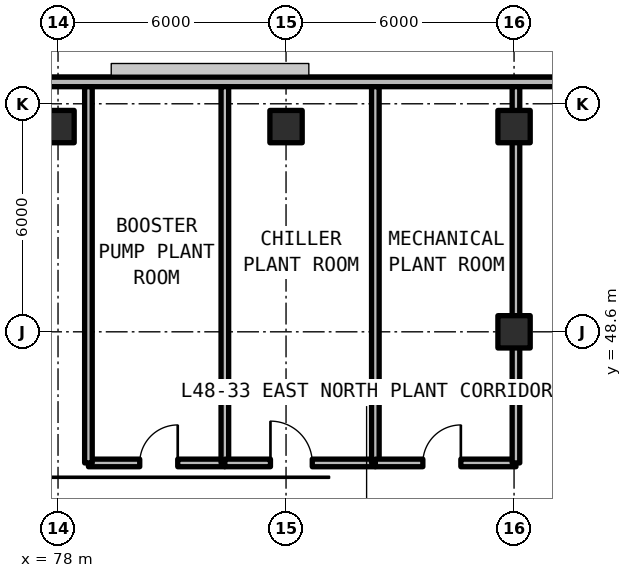
"""IFC4 building model, lengths in metres.
Left out: names, types, materials, properties, quantities, classifications, styles, units other than length and angle.
Written with IfcOpenShell. Run it as: python <this file> out.ifc"""

import sys

from ifc_helpers import new_model, si_unit, direction, frame, frame_2d, origin, origin_2d, place, context, subcontext, project, spatial, rectangle, extrude, element, fill, save


model = new_model("IFC4")
c1 = context("Model", 3, precision=1e-05, world=origin(), true_north=direction((0.0, 1.0)))
c2 = subcontext(c1, "Body", "Model", "MODEL_VIEW")
j1 = project(units=[si_unit("LENGTHUNIT", "METRE"), si_unit("PLANEANGLEUNIT", "RADIAN")], contexts=[c1])
p1 = place(None, origin())
s1 = spatial("IfcSite", under=j1, at=p1, CompositionType="ELEMENT")
p2 = place(p1, origin())
s2 = spatial("IfcBuilding", under=s1, at=p2, CompositionType="ELEMENT")
p3 = place(p2, frame((0.0, 0.0, 172.92)))
s3 = spatial("IfcBuildingStorey", under=s2, at=p3, CompositionType="ELEMENT", Elevation=172.92)
p4 = place(p3, frame((90.0, 48.6, 0.0), z_axis=(0.0, 0.0, 1.0), x_axis=(1.0, 0.0, 0.0)))
e1 = element("IfcColumn", 1, at=p4, inside=s3, PredefinedType="COLUMN", context=c2, shape_type="SweptSolid", body=[
    extrude(rectangle(XDim=0.85, YDim=0.85, at=origin_2d()), origin(), (0.0, 0.0, 1.0), 4.95),
])
for number, where, z_axis, x_axis in (
    (2, (78.0, 54.0, 0.0), (0.0, 0.0, 1.0), (1.0, 0.0, 0.0)),
    (3, (84.0, 54.0, 0.0), (0.0, 0.0, 1.0), (1.0, 0.0, 0.0)),
    (4, (90.0, 54.0, 0.0), (0.0, 0.0, 1.0), (1.0, 0.0, 0.0)),
):
    element("IfcColumn", number, at=place(p3, frame(where, z_axis=z_axis, x_axis=x_axis)), inside=s3, PredefinedType="COLUMN", context=c2, shape_type="SweptSolid", body=[
        extrude(rectangle(XDim=0.85, YDim=0.85, at=origin_2d()), origin(), (0.0, 0.0, 1.0), 4.67),
    ])
p5 = place(p3, frame((95.748, 55.175, 0.0), z_axis=(0.0, 0.0, 1.0), x_axis=(-1.0, 0.0, 0.0)))
e5 = element("IfcWall", 5, at=p5, inside=s3, PredefinedType="SOLIDWALL", context=c2, shape_type="SweptSolid", body=[
    extrude(rectangle(XDim=20.823, YDim=0.25, at=frame_2d((10.412, 0.0))), origin(), (0.0, 0.0, 1.0), 4.67),
])
p6 = place(p3, frame((78.8, 45.15, 0.0), z_axis=(0.0, 0.0, 1.0), x_axis=(1.0, 0.0, 0.0)))
e6 = element("IfcWall", 6, at=p6, inside=s3, PredefinedType="SOLIDWALL", context=c2, shape_type="SweptSolid", body=[
    extrude(rectangle(XDim=3.59, YDim=0.2, at=frame_2d((1.795, 0.0))), origin(), (0.0, 0.0, 1.0), 3.89),
])
p7 = place(p6, frame((1.35, 0.0, 0.0)))
e7 = element("IfcOpeningElement", 7, at=p7, cuts=e6, PredefinedType="OPENING", context=c2, shape_type="SweptSolid", body=[
    extrude(rectangle(XDim=1.0, YDim=2.15, at=frame_2d((0.5, 1.075))), frame((0.0, 0.11, 0.0), z_axis=(0.0, -1.0, 0.0), x_axis=(1.0, 0.0, 0.0)), (0.0, 0.0, 1.0), 0.22),
])
for number, where, z_axis, x_axis in (
    (8, (78.8, 45.15, 0.0), (0.0, 0.0, 1.0), (0.0, 1.0, 0.0)),
    (9, (82.39, 45.15, 0.0), (0.0, 0.0, 1.0), (0.0, 1.0, 0.0)),
):
    element("IfcWall", number, at=place(p3, frame(where, z_axis=z_axis, x_axis=x_axis)), inside=s3, PredefinedType="SOLIDWALL", context=c2, shape_type="SweptSolid", body=[
        extrude(rectangle(XDim=9.9, YDim=0.2, at=frame_2d((4.95, 0.0))), origin(), (0.0, 0.0, 1.0), 3.89),
    ])
p8 = place(p3, frame((82.39, 45.15, 0.0), z_axis=(0.0, 0.0, 1.0), x_axis=(1.0, 0.0, 0.0)))
e10 = element("IfcWall", 10, at=p8, inside=s3, PredefinedType="SOLIDWALL", context=c2, shape_type="SweptSolid", body=[
    extrude(rectangle(XDim=3.96, YDim=0.2, at=frame_2d((1.98, 0.0))), origin(), (0.0, 0.0, 1.0), 3.89),
])
p9 = place(p8, frame((1.2, 0.0, 0.0)))
e11 = element("IfcOpeningElement", 11, at=p9, cuts=e10, PredefinedType="OPENING", context=c2, shape_type="SweptSolid", body=[
    extrude(rectangle(XDim=1.1, YDim=2.15, at=frame_2d((0.55, 1.075))), frame((0.0, 0.11, 0.0), z_axis=(0.0, -1.0, 0.0), x_axis=(1.0, 0.0, 0.0)), (0.0, 0.0, 1.0), 0.22),
])
p10 = place(p3, frame((86.35, 45.15, 0.0), z_axis=(0.0, 0.0, 1.0), x_axis=(0.0, 1.0, 0.0)))
e12 = element("IfcWall", 12, at=p10, inside=s3, PredefinedType="SOLIDWALL", context=c2, shape_type="SweptSolid", body=[
    extrude(rectangle(XDim=9.9, YDim=0.2, at=frame_2d((4.95, 0.0))), origin(), (0.0, 0.0, 1.0), 3.89),
])
p11 = place(p3, frame((86.35, 45.15, 0.0), z_axis=(0.0, 0.0, 1.0), x_axis=(1.0, 0.0, 0.0)))
e13 = element("IfcWall", 13, at=p11, inside=s3, PredefinedType="SOLIDWALL", context=c2, shape_type="SweptSolid", body=[
    extrude(rectangle(XDim=3.7, YDim=0.2, at=frame_2d((1.85, 0.0))), origin(), (0.0, 0.0, 1.0), 3.89),
])
p12 = place(p11, frame((1.25, 0.0, 0.0)))
e14 = element("IfcOpeningElement", 14, at=p12, cuts=e13, PredefinedType="OPENING", context=c2, shape_type="SweptSolid", body=[
    extrude(rectangle(XDim=1.0, YDim=2.15, at=frame_2d((0.5, 1.075))), frame((0.0, 0.11, 0.0), z_axis=(0.0, -1.0, 0.0), x_axis=(1.0, 0.0, 0.0)), (0.0, 0.0, 1.0), 0.22),
])
p13 = place(p3, frame((90.05, 45.15, 0.0), z_axis=(0.0, 0.0, 1.0), x_axis=(0.0, 1.0, 0.0)))
e15 = element("IfcWall", 15, at=p13, inside=s3, PredefinedType="SOLIDWALL", context=c2, shape_type="SweptSolid", body=[
    extrude(rectangle(XDim=9.9, YDim=0.2, at=frame_2d((4.95, 0.0))), origin(), (0.0, 0.0, 1.0), 3.647),
])
p14 = place(p7, origin())
e16 = element("IfcDoor", 16, at=p14, inside=s3, OperationType="SINGLE_SWING_RIGHT", PredefinedType="DOOR", context=c2, shape_type="SweptSolid", body=[
    extrude(rectangle(XDim=1.0, YDim=2.15, at=frame_2d((0.5, 1.075))), frame((0.0, 0.025, 0.0), z_axis=(0.0, -1.0, 0.0), x_axis=(1.0, 0.0, 0.0)), (0.0, 0.0, 1.0), 0.05),
])
fill(e7, e16)
p15 = place(p9, origin())
e17 = element("IfcDoor", 17, at=p15, inside=s3, OperationType="SINGLE_SWING_LEFT", PredefinedType="DOOR", context=c2, shape_type="SweptSolid", body=[
    extrude(rectangle(XDim=1.1, YDim=2.15, at=frame_2d((0.55, 1.075))), frame((0.0, 0.025, 0.0), z_axis=(0.0, -1.0, 0.0), x_axis=(1.0, 0.0, 0.0)), (0.0, 0.0, 1.0), 0.05),
])
fill(e11, e17)
p16 = place(p12, origin())
e18 = element("IfcDoor", 18, at=p16, inside=s3, OperationType="SINGLE_SWING_RIGHT", PredefinedType="DOOR", context=c2, shape_type="SweptSolid", body=[
    extrude(rectangle(XDim=1.0, YDim=2.15, at=frame_2d((0.5, 1.075))), frame((0.0, 0.025, 0.0), z_axis=(0.0, -1.0, 0.0), x_axis=(1.0, 0.0, 0.0)), (0.0, 0.0, 1.0), 0.05),
])
fill(e14, e18)
save(model, sys.argv[1])
